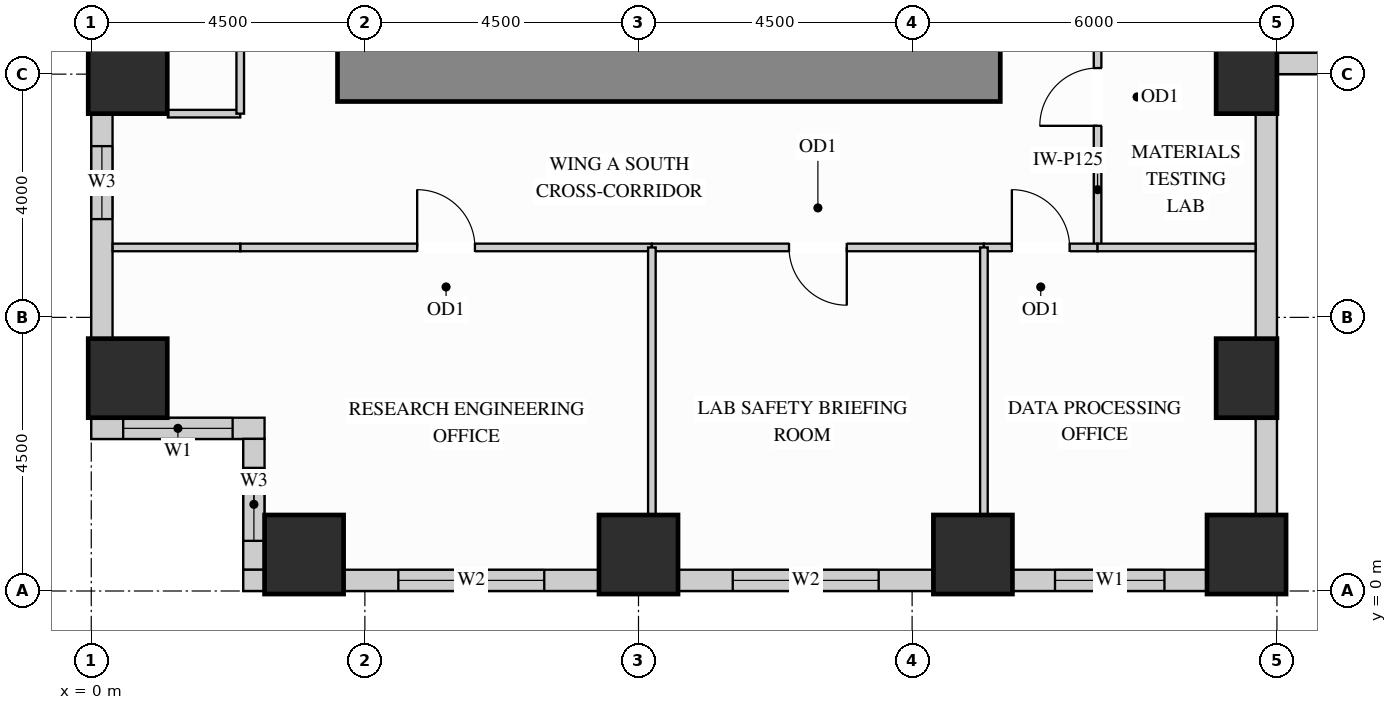
"""IFC4 building model, lengths in metres.
Left out: names, types, materials, properties, quantities, classifications, styles, units other than length and angle.
Written with IfcOpenShell. Run it as: python <this file> out.ifc"""

import sys

from ifc_helpers import new_model, si_unit, direction, frame, frame_2d, origin, origin_2d, place, context, subcontext, project, spatial, rectangle, extrude, source, transform, mapped, element, fill, save


model = new_model("IFC4")
c1 = context("Model", 3, precision=1e-05, world=origin(), true_north=direction((0.0, 1.0)))
c2 = subcontext(c1, "Body", "Model", "MODEL_VIEW")
j1 = project(units=[si_unit("LENGTHUNIT", "METRE"), si_unit("PLANEANGLEUNIT", "RADIAN")], contexts=[c1])
p1 = place(None, origin())
s1 = spatial("IfcSite", under=j1, at=p1, CompositionType="ELEMENT")
p2 = place(p1, origin())
s2 = spatial("IfcBuilding", under=s1, at=p2, CompositionType="ELEMENT")
p3 = place(p2, frame((0.0, 0.0, 58.5)))
s3 = spatial("IfcBuildingStorey", under=s2, at=p3, CompositionType="ELEMENT", Elevation=58.5)
m1 = source(origin(), c2, "Body", "SweptSolid", [
    extrude(rectangle(XDim=1.0, YDim=1.3, at=origin_2d()), origin(), (0.0, 0.0, 1.0), 3.38),
])
for number, where, z_axis, x_axis in (
    (1, (19.0, 3.5, 0.0), (0.0, 0.0, 1.0), (1.0, 0.0, 0.0)),
    (2, (19.0, 8.5, 0.0), (0.0, 0.0, 1.0), (1.0, 0.0, 0.0)),
):
    element("IfcColumn", number, at=place(p3, frame(where, z_axis=z_axis, x_axis=x_axis)), inside=s3, PredefinedType="COLUMN", context=c2, shape_type="MappedRepresentation", body=[
        mapped(m1, transform((0.0, 0.0, 0.0), x_axis=(1.0, 0.0, 0.0), y_axis=(0.0, 1.0, 0.0), z_axis=(0.0, 0.0, 1.0))),
    ])
m2 = source(origin(), c2, "Body", "SweptSolid", [
    extrude(rectangle(XDim=1.3, YDim=1.3, at=origin_2d()), origin(), (0.0, 0.0, 1.0), 3.38),
])
for number, where, z_axis, x_axis in (
    (3, (14.5, 0.6, 0.0), (0.0, 0.0, 1.0), (1.0, 0.0, 0.0)),
    (4, (19.0, 0.6, 0.0), (0.0, 0.0, 1.0), (1.0, 0.0, 0.0)),
    (5, (3.5, 0.6, 0.0), (0.0, 0.0, 1.0), (1.0, 0.0, 0.0)),
    (6, (9.0, 0.6, 0.0), (0.0, 0.0, 1.0), (1.0, 0.0, 0.0)),
    (7, (0.6, 3.5, 0.0), (0.0, 0.0, 1.0), (1.0, 0.0, 0.0)),
    (8, (0.6, 8.5, 0.0), (0.0, 0.0, 1.0), (1.0, 0.0, 0.0)),
):
    element("IfcColumn", number, at=place(p3, frame(where, z_axis=z_axis, x_axis=x_axis)), inside=s3, PredefinedType="COLUMN", context=c2, shape_type="MappedRepresentation", body=[
        mapped(m2, transform((0.0, 0.0, 0.0), x_axis=(1.0, 0.0, 0.0), y_axis=(0.0, 1.0, 0.0), z_axis=(0.0, 0.0, 1.0))),
    ])
m3 = source(origin(), c2, "Body", "SweptSolid", [
    extrude(rectangle(XDim=10.9, YDim=0.9, at=frame_2d((5.45, 0.0))), origin(), (0.0, 0.0, 1.0), 3.38),
])
p4 = place(p3, frame((4.05, 8.5, 0.0), z_axis=(0.0, 0.0, 1.0), x_axis=(1.0, 0.0, 0.0)))
e9 = element("IfcWall", 9, at=p4, inside=s3, PredefinedType="SHEAR", context=c2, shape_type="MappedRepresentation", body=[
    mapped(m3, transform((0.0, 0.0, 0.0), x_axis=(1.0, 0.0, 0.0), y_axis=(0.0, 1.0, 0.0), z_axis=(0.0, 0.0, 1.0))),
])
p5 = place(p3, frame((0.175, 7.852, 0.0), z_axis=(0.0, 0.0, 1.0), x_axis=(0.0, -1.0, 0.0)))
e10 = element("IfcWall", 10, at=p5, inside=s3, PredefinedType="SOLIDWALL", context=c2, shape_type="SweptSolid", body=[
    extrude(rectangle(XDim=3.704, YDim=0.35, at=frame_2d((1.852, 0.0))), origin(), (0.0, 0.0, 1.0), 2.51),
])
p6 = place(p5, frame((0.536, 0.0, 0.78)))
e11 = element("IfcOpeningElement", 11, at=p6, cuts=e10, PredefinedType="OPENING", context=c2, shape_type="SweptSolid", body=[
    extrude(rectangle(XDim=1.2, YDim=1.55, at=frame_2d((0.6, 0.775))), frame((0.0, 0.185, 0.0), z_axis=(0.0, -1.0, 0.0), x_axis=(1.0, 0.0, 0.0)), (0.0, 0.0, 1.0), 0.37),
])
p7 = place(p3, frame((0.0, 2.675, 0.0), z_axis=(0.0, 0.0, 1.0), x_axis=(1.0, 0.0, 0.0)))
e12 = element("IfcWall", 12, at=p7, inside=s3, PredefinedType="SOLIDWALL", context=c2, shape_type="SweptSolid", body=[
    extrude(rectangle(XDim=2.85, YDim=0.35, at=frame_2d((1.425, 0.0))), origin(), (0.0, 0.0, 1.0), 3.365),
])
p8 = place(p7, frame((0.525, 0.0, 0.78)))
e13 = element("IfcOpeningElement", 13, at=p8, cuts=e12, PredefinedType="OPENING", context=c2, shape_type="SweptSolid", body=[
    extrude(rectangle(XDim=1.8, YDim=2.1, at=frame_2d((0.9, 1.05))), frame((0.0, 0.185, 0.0), z_axis=(0.0, -1.0, 0.0), x_axis=(1.0, 0.0, 0.0)), (0.0, 0.0, 1.0), 0.37),
])
p9 = place(p3, frame((2.675, 2.502, 0.0), z_axis=(0.0, 0.0, 1.0), x_axis=(0.0, -1.0, 0.0)))
e14 = element("IfcWall", 14, at=p9, inside=s3, PredefinedType="SOLIDWALL", context=c2, shape_type="SweptSolid", body=[
    extrude(rectangle(XDim=2.154, YDim=0.35, at=frame_2d((1.077, 0.0))), origin(), (0.0, 0.0, 1.0), 3.365),
])
p10 = place(p9, frame((0.477, 0.0, 0.78)))
e15 = element("IfcOpeningElement", 15, at=p10, cuts=e14, PredefinedType="OPENING", context=c2, shape_type="SweptSolid", body=[
    extrude(rectangle(XDim=1.2, YDim=2.1, at=frame_2d((0.6, 1.05))), frame((0.0, 0.185, 0.0), z_axis=(0.0, -1.0, 0.0), x_axis=(1.0, 0.0, 0.0)), (0.0, 0.0, 1.0), 0.37),
])
m4 = source(origin(), c2, "Body", "SweptSolid", [
    extrude(rectangle(XDim=0.352, YDim=0.35, at=frame_2d((0.176, 0.0))), origin(), (0.0, 0.0, 1.0), 3.365),
])
p11 = place(p3, frame((2.5, 0.175, 0.0), z_axis=(0.0, 0.0, 1.0), x_axis=(1.0, 0.0, 0.0)))
e16 = element("IfcWall", 16, at=p11, inside=s3, PredefinedType="SOLIDWALL", context=c2, shape_type="MappedRepresentation", body=[
    mapped(m4, transform((0.0, 0.0, 0.0), x_axis=(1.0, 0.0, 0.0), y_axis=(0.0, 1.0, 0.0), z_axis=(0.0, 0.0, 1.0))),
])
p12 = place(p3, frame((4.148, 0.175, 0.0), z_axis=(0.0, 0.0, 1.0), x_axis=(1.0, 0.0, 0.0)))
e17 = element("IfcWall", 17, at=p12, inside=s3, PredefinedType="SOLIDWALL", context=c2, shape_type="SweptSolid", body=[
    extrude(rectangle(XDim=4.204, YDim=0.35, at=frame_2d((2.102, 0.0))), origin(), (0.0, 0.0, 1.0), 2.51),
])
p13 = place(p12, frame((0.902, 0.0, 0.78)))
e18 = element("IfcOpeningElement", 18, at=p13, cuts=e17, PredefinedType="OPENING", context=c2, shape_type="SweptSolid", body=[
    extrude(rectangle(XDim=2.4, YDim=1.55, at=frame_2d((1.2, 0.775))), frame((0.0, 0.185, 0.0), z_axis=(0.0, -1.0, 0.0), x_axis=(1.0, 0.0, 0.0)), (0.0, 0.0, 1.0), 0.37),
])
p14 = place(p3, frame((9.648, 0.175, 0.0), z_axis=(0.0, 0.0, 1.0), x_axis=(1.0, 0.0, 0.0)))
e19 = element("IfcWall", 19, at=p14, inside=s3, PredefinedType="SOLIDWALL", context=c2, shape_type="SweptSolid", body=[
    extrude(rectangle(XDim=4.204, YDim=0.35, at=frame_2d((2.102, 0.0))), origin(), (0.0, 0.0, 1.0), 2.51),
])
p15 = place(p14, frame((0.902, 0.0, 0.78)))
e20 = element("IfcOpeningElement", 20, at=p15, cuts=e19, PredefinedType="OPENING", context=c2, shape_type="SweptSolid", body=[
    extrude(rectangle(XDim=2.4, YDim=1.55, at=frame_2d((1.2, 0.775))), frame((0.0, 0.185, 0.0), z_axis=(0.0, -1.0, 0.0), x_axis=(1.0, 0.0, 0.0)), (0.0, 0.0, 1.0), 0.37),
])
p16 = place(p3, frame((15.148, 0.175, 0.0), z_axis=(0.0, 0.0, 1.0), x_axis=(1.0, 0.0, 0.0)))
e21 = element("IfcWall", 21, at=p16, inside=s3, PredefinedType="SOLIDWALL", context=c2, shape_type="SweptSolid", body=[
    extrude(rectangle(XDim=3.204, YDim=0.35, at=frame_2d((1.602, 0.0))), origin(), (0.0, 0.0, 1.0), 2.51),
])
p17 = place(p16, frame((0.702, 0.0, 0.78)))
e22 = element("IfcOpeningElement", 22, at=p17, cuts=e21, PredefinedType="OPENING", context=c2, shape_type="SweptSolid", body=[
    extrude(rectangle(XDim=1.8, YDim=1.55, at=frame_2d((0.9, 0.775))), frame((0.0, 0.185, 0.0), z_axis=(0.0, -1.0, 0.0), x_axis=(1.0, 0.0, 0.0)), (0.0, 0.0, 1.0), 0.37),
])
m5 = source(origin(), c2, "Body", "SweptSolid", [
    extrude(rectangle(XDim=1.604, YDim=0.35, at=frame_2d((0.802, 0.0))), origin(), (0.0, 0.0, 1.0), 2.51),
])
p18 = place(p3, frame((19.325, 1.248, 0.0), z_axis=(0.0, 0.0, 1.0), x_axis=(0.0, 1.0, 0.0)))
e23 = element("IfcWall", 23, at=p18, inside=s3, PredefinedType="SOLIDWALL", context=c2, shape_type="MappedRepresentation", body=[
    mapped(m5, transform((0.0, 0.0, 0.0), x_axis=(1.0, 0.0, 0.0), y_axis=(0.0, 1.0, 0.0), z_axis=(0.0, 0.0, 1.0))),
])
m6 = source(origin(), c2, "Body", "SweptSolid", [
    extrude(rectangle(XDim=3.704, YDim=0.35, at=frame_2d((1.852, 0.0))), origin(), (0.0, 0.0, 1.0), 2.51),
])
p19 = place(p3, frame((19.325, 4.148, 0.0), z_axis=(0.0, 0.0, 1.0), x_axis=(0.0, 1.0, 0.0)))
e24 = element("IfcWall", 24, at=p19, inside=s3, PredefinedType="SOLIDWALL", context=c2, shape_type="MappedRepresentation", body=[
    mapped(m6, transform((0.0, 0.0, 0.0), x_axis=(1.0, 0.0, 0.0), y_axis=(0.0, 1.0, 0.0), z_axis=(0.0, 0.0, 1.0))),
])
p20 = place(p3, frame((19.498, 8.675, 0.0), z_axis=(0.0, 0.0, 1.0), x_axis=(1.0, 0.0, 0.0)))
e25 = element("IfcWall", 25, at=p20, inside=s3, PredefinedType="SOLIDWALL", context=c2, shape_type="SweptSolid", body=[
    extrude(rectangle(XDim=3.404, YDim=0.35, at=frame_2d((1.702, 0.0))), origin(), (0.0, 0.0, 1.0), 3.365),
])
p21 = place(p20, frame((0.952, 0.0, 0.78)))
e26 = element("IfcOpeningElement", 26, at=p21, cuts=e25, PredefinedType="OPENING", context=c2, shape_type="SweptSolid", body=[
    extrude(rectangle(XDim=1.5, YDim=2.0, at=frame_2d((0.75, 1.0))), frame((0.0, 0.185, 0.0), z_axis=(0.0, -1.0, 0.0), x_axis=(1.0, 0.0, 0.0)), (0.0, 0.0, 1.0), 0.37),
])
p22 = place(p3, frame((16.55, 5.65, 0.0), z_axis=(0.0, 0.0, 1.0), x_axis=(0.0, 1.0, 0.0)))
e27 = element("IfcWall", 27, at=p22, inside=s3, PredefinedType="PARTITIONING", context=c2, shape_type="SweptSolid", body=[
    extrude(rectangle(XDim=4.95, YDim=0.125, at=frame_2d((2.475, 0.0))), origin(), (0.0, 0.0, 1.0), 3.365),
])
p23 = place(p22, frame((2.0, 0.0, 0.0)))
e28 = element("IfcOpeningElement", 28, at=p23, cuts=e27, PredefinedType="OPENING", context=c2, shape_type="SweptSolid", body=[
    extrude(rectangle(XDim=0.95, YDim=2.15, at=frame_2d((0.475, 1.075))), frame((0.0, 0.073, 0.0), z_axis=(0.0, -1.0, 0.0), x_axis=(1.0, 0.0, 0.0)), (0.0, 0.0, 1.0), 0.145),
])
m7 = source(origin(), c2, "Body", "SweptSolid", [
    extrude(rectangle(XDim=1.19, YDim=0.125, at=frame_2d((0.595, 0.0))), origin(), (0.0, 0.0, 1.0), 3.365),
])
p24 = place(p3, frame((1.26, 7.85, 0.0), z_axis=(0.0, 0.0, 1.0), x_axis=(1.0, 0.0, 0.0)))
e29 = element("IfcWall", 29, at=p24, inside=s3, PredefinedType="PARTITIONING", context=c2, shape_type="MappedRepresentation", body=[
    mapped(m7, transform((0.0, 0.0, 0.0), x_axis=(1.0, 0.0, 0.0), y_axis=(0.0, 1.0, 0.0), z_axis=(0.0, 0.0, 1.0))),
])
p25 = place(p3, frame((2.45, 5.65, 0.0), z_axis=(0.0, 0.0, 1.0), x_axis=(1.0, 0.0, 0.0)))
e30 = element("IfcWall", 30, at=p25, inside=s3, PredefinedType="PARTITIONING", context=c2, shape_type="SweptSolid", body=[
    extrude(rectangle(XDim=6.77, YDim=0.125, at=frame_2d((3.385, 0.0))), origin(), (0.0, 0.0, 1.0), 3.365),
])
p26 = place(p25, frame((2.91, 0.0, 0.0)))
e31 = element("IfcOpeningElement", 31, at=p26, cuts=e30, PredefinedType="OPENING", context=c2, shape_type="SweptSolid", body=[
    extrude(rectangle(XDim=0.95, YDim=2.15, at=frame_2d((0.475, 1.075))), frame((0.0, 0.073, 0.0), z_axis=(0.0, -1.0, 0.0), x_axis=(1.0, 0.0, 0.0)), (0.0, 0.0, 1.0), 0.145),
])
p27 = place(p3, frame((9.22, 5.65, 0.0), z_axis=(0.0, 0.0, 1.0), x_axis=(1.0, 0.0, 0.0)))
e32 = element("IfcWall", 32, at=p27, inside=s3, PredefinedType="PARTITIONING", context=c2, shape_type="SweptSolid", body=[
    extrude(rectangle(XDim=5.461, YDim=0.125, at=frame_2d((2.73, 0.0))), origin(), (0.0, 0.0, 1.0), 3.365),
])
p28 = place(p27, frame((2.256, 0.0, 0.0)))
e33 = element("IfcOpeningElement", 33, at=p28, cuts=e32, PredefinedType="OPENING", context=c2, shape_type="SweptSolid", body=[
    extrude(rectangle(XDim=0.95, YDim=2.15, at=frame_2d((0.475, 1.075))), frame((0.0, 0.073, 0.0), z_axis=(0.0, -1.0, 0.0), x_axis=(1.0, 0.0, 0.0)), (0.0, 0.0, 1.0), 0.145),
])
p29 = place(p3, frame((14.681, 5.65, 0.0), z_axis=(0.0, 0.0, 1.0), x_axis=(1.0, 0.0, 0.0)))
e34 = element("IfcWall", 34, at=p29, inside=s3, PredefinedType="PARTITIONING", context=c2, shape_type="SweptSolid", body=[
    extrude(rectangle(XDim=1.869, YDim=0.125, at=frame_2d((0.935, 0.0))), origin(), (0.0, 0.0, 1.0), 3.365),
])
p30 = place(p29, frame((0.459, 0.0, 0.0)))
e35 = element("IfcOpeningElement", 35, at=p30, cuts=e34, PredefinedType="OPENING", context=c2, shape_type="SweptSolid", body=[
    extrude(rectangle(XDim=0.95, YDim=2.15, at=frame_2d((0.475, 1.075))), frame((0.0, 0.073, 0.0), z_axis=(0.0, -1.0, 0.0), x_axis=(1.0, 0.0, 0.0)), (0.0, 0.0, 1.0), 0.145),
])
m8 = source(origin(), c2, "Body", "SweptSolid", [
    extrude(rectangle(XDim=2.098, YDim=0.125, at=frame_2d((1.049, 0.0))), origin(), (0.0, 0.0, 1.0), 3.365),
])
p31 = place(p3, frame((0.352, 5.65, 0.0), z_axis=(0.0, 0.0, 1.0), x_axis=(1.0, 0.0, 0.0)))
e36 = element("IfcWall", 36, at=p31, inside=s3, PredefinedType="PARTITIONING", context=c2, shape_type="MappedRepresentation", body=[
    mapped(m8, transform((0.0, 0.0, 0.0), x_axis=(1.0, 0.0, 0.0), y_axis=(0.0, 1.0, 0.0), z_axis=(0.0, 0.0, 1.0))),
])
m9 = source(origin(), c2, "Body", "SweptSolid", [
    extrude(rectangle(XDim=2.598, YDim=0.125, at=frame_2d((1.299, 0.0))), origin(), (0.0, 0.0, 1.0), 3.365),
])
p32 = place(p3, frame((16.55, 5.65, 0.0), z_axis=(0.0, 0.0, 1.0), x_axis=(1.0, 0.0, 0.0)))
e37 = element("IfcWall", 37, at=p32, inside=s3, PredefinedType="PARTITIONING", context=c2, shape_type="MappedRepresentation", body=[
    mapped(m9, transform((0.0, 0.0, 0.0), x_axis=(1.0, 0.0, 0.0), y_axis=(0.0, 1.0, 0.0), z_axis=(0.0, 0.0, 1.0))),
])
m10 = source(origin(), c2, "Body", "SweptSolid", [
    extrude(rectangle(XDim=4.39, YDim=0.125, at=frame_2d((2.195, 0.0))), origin(), (0.0, 0.0, 1.0), 3.365),
])
for number, where, z_axis, x_axis in (
    (38, (9.22, 1.26, 0.0), (0.0, 0.0, 1.0), (0.0, 1.0, 0.0)),
    (39, (14.681, 1.26, 0.0), (0.0, 0.0, 1.0), (0.0, 1.0, 0.0)),
):
    element("IfcWall", number, at=place(p3, frame(where, z_axis=z_axis, x_axis=x_axis)), inside=s3, PredefinedType="PARTITIONING", context=c2, shape_type="MappedRepresentation", body=[
        mapped(m10, transform((0.0, 0.0, 0.0), x_axis=(1.0, 0.0, 0.0), y_axis=(0.0, 1.0, 0.0), z_axis=(0.0, 0.0, 1.0))),
    ])
p33 = place(p3, frame((2.45, 7.85, 0.0), z_axis=(0.0, 0.0, 1.0), x_axis=(0.0, 1.0, 0.0)))
e40 = element("IfcWall", 40, at=p33, inside=s3, PredefinedType="PARTITIONING", context=c2, shape_type="SweptSolid", body=[
    extrude(rectangle(XDim=7.25, YDim=0.125, at=frame_2d((3.625, 0.0))), origin(), (0.0, 0.0, 1.0), 3.365),
])
p34 = place(p33, frame((3.15, 0.0, 0.0)))
e41 = element("IfcOpeningElement", 41, at=p34, cuts=e40, PredefinedType="OPENING", context=c2, shape_type="SweptSolid", body=[
    extrude(rectangle(XDim=0.95, YDim=2.15, at=frame_2d((0.475, 1.075))), frame((0.0, 0.073, 0.0), z_axis=(0.0, -1.0, 0.0), x_axis=(1.0, 0.0, 0.0)), (0.0, 0.0, 1.0), 0.145),
])
m11 = source(origin(), c2, "Body", "SweptSolid", [
    extrude(rectangle(XDim=0.95, YDim=2.15, at=frame_2d((0.475, 1.075))), frame((0.0, 0.025, 0.0), z_axis=(0.0, -1.0, 0.0), x_axis=(1.0, 0.0, 0.0)), (0.0, 0.0, 1.0), 0.05),
])
p35 = place(p23, origin())
e42 = element("IfcDoor", 42, at=p35, inside=s3, OperationType="SINGLE_SWING_LEFT", PredefinedType="DOOR", context=c2, shape_type="MappedRepresentation", body=[
    mapped(m11, transform((0.0, 0.0, 0.0), x_axis=(1.0, 0.0, 0.0), y_axis=(0.0, 1.0, 0.0), z_axis=(0.0, 0.0, 1.0))),
])
fill(e28, e42)
p36 = place(p26, origin())
e43 = element("IfcDoor", 43, at=p36, inside=s3, OperationType="SINGLE_SWING_LEFT", PredefinedType="DOOR", context=c2, shape_type="MappedRepresentation", body=[
    mapped(m11, transform((0.0, 0.0, 0.0), x_axis=(1.0, 0.0, 0.0), y_axis=(0.0, 1.0, 0.0), z_axis=(0.0, 0.0, 1.0))),
])
fill(e31, e43)
p37 = place(p28, origin())
e44 = element("IfcDoor", 44, at=p37, inside=s3, OperationType="SINGLE_SWING_RIGHT", PredefinedType="DOOR", context=c2, shape_type="MappedRepresentation", body=[
    mapped(m11, transform((0.0, 0.0, 0.0), x_axis=(1.0, 0.0, 0.0), y_axis=(0.0, 1.0, 0.0), z_axis=(0.0, 0.0, 1.0))),
])
fill(e33, e44)
p38 = place(p30, origin())
e45 = element("IfcDoor", 45, at=p38, inside=s3, OperationType="SINGLE_SWING_LEFT", PredefinedType="DOOR", context=c2, shape_type="MappedRepresentation", body=[
    mapped(m11, transform((0.0, 0.0, 0.0), x_axis=(1.0, 0.0, 0.0), y_axis=(0.0, 1.0, 0.0), z_axis=(0.0, 0.0, 1.0))),
])
fill(e35, e45)
m12 = source(origin(), c2, "Body", "SweptSolid", [
    extrude(rectangle(XDim=1.8, YDim=2.1, at=frame_2d((0.9, 1.05))), frame((0.0, 0.03, 0.0), z_axis=(0.0, -1.0, 0.0), x_axis=(1.0, 0.0, 0.0)), (0.0, 0.0, 1.0), 0.06),
])
p39 = place(p8, origin())
e46 = element("IfcWindow", 46, at=p39, inside=s3, PartitioningType="SINGLE_PANEL", PredefinedType="WINDOW", context=c2, shape_type="MappedRepresentation", body=[
    mapped(m12, transform((0.0, 0.0, 0.0), x_axis=(1.0, 0.0, 0.0), y_axis=(0.0, 1.0, 0.0), z_axis=(0.0, 0.0, 1.0))),
])
fill(e13, e46)
m13 = source(origin(), c2, "Body", "SweptSolid", [
    extrude(rectangle(XDim=1.8, YDim=1.55, at=frame_2d((0.9, 0.775))), frame((0.0, 0.03, 0.0), z_axis=(0.0, -1.0, 0.0), x_axis=(1.0, 0.0, 0.0)), (0.0, 0.0, 1.0), 0.06),
])
p40 = place(p17, origin())
e47 = element("IfcWindow", 47, at=p40, inside=s3, PartitioningType="SINGLE_PANEL", PredefinedType="WINDOW", context=c2, shape_type="MappedRepresentation", body=[
    mapped(m13, transform((0.0, 0.0, 0.0), x_axis=(1.0, 0.0, 0.0), y_axis=(0.0, 1.0, 0.0), z_axis=(0.0, 0.0, 1.0))),
])
fill(e22, e47)
m14 = source(origin(), c2, "Body", "SweptSolid", [
    extrude(rectangle(XDim=2.4, YDim=1.55, at=frame_2d((1.2, 0.775))), frame((0.0, 0.03, 0.0), z_axis=(0.0, -1.0, 0.0), x_axis=(1.0, 0.0, 0.0)), (0.0, 0.0, 1.0), 0.06),
])
p41 = place(p13, origin())
e48 = element("IfcWindow", 48, at=p41, inside=s3, PartitioningType="SINGLE_PANEL", PredefinedType="WINDOW", context=c2, shape_type="MappedRepresentation", body=[
    mapped(m14, transform((0.0, 0.0, 0.0), x_axis=(1.0, 0.0, 0.0), y_axis=(0.0, 1.0, 0.0), z_axis=(0.0, 0.0, 1.0))),
])
fill(e18, e48)
p42 = place(p15, origin())
e49 = element("IfcWindow", 49, at=p42, inside=s3, PartitioningType="SINGLE_PANEL", PredefinedType="WINDOW", context=c2, shape_type="MappedRepresentation", body=[
    mapped(m14, transform((0.0, 0.0, 0.0), x_axis=(1.0, 0.0, 0.0), y_axis=(0.0, 1.0, 0.0), z_axis=(0.0, 0.0, 1.0))),
])
fill(e20, e49)
m15 = source(origin(), c2, "Body", "SweptSolid", [
    extrude(rectangle(XDim=1.2, YDim=1.55, at=frame_2d((0.6, 0.775))), frame((0.0, 0.03, 0.0), z_axis=(0.0, -1.0, 0.0), x_axis=(1.0, 0.0, 0.0)), (0.0, 0.0, 1.0), 0.06),
])
p43 = place(p6, origin())
e50 = element("IfcWindow", 50, at=p43, inside=s3, PartitioningType="SINGLE_PANEL", PredefinedType="WINDOW", context=c2, shape_type="MappedRepresentation", body=[
    mapped(m15, transform((0.0, 0.0, 0.0), x_axis=(1.0, 0.0, 0.0), y_axis=(0.0, 1.0, 0.0), z_axis=(0.0, 0.0, 1.0))),
])
fill(e11, e50)
m16 = source(origin(), c2, "Body", "SweptSolid", [
    extrude(rectangle(XDim=1.2, YDim=2.1, at=frame_2d((0.6, 1.05))), frame((0.0, 0.03, 0.0), z_axis=(0.0, -1.0, 0.0), x_axis=(1.0, 0.0, 0.0)), (0.0, 0.0, 1.0), 0.06),
])
p44 = place(p10, origin())
e51 = element("IfcWindow", 51, at=p44, inside=s3, PartitioningType="SINGLE_PANEL", PredefinedType="WINDOW", context=c2, shape_type="MappedRepresentation", body=[
    mapped(m16, transform((0.0, 0.0, 0.0), x_axis=(1.0, 0.0, 0.0), y_axis=(0.0, 1.0, 0.0), z_axis=(0.0, 0.0, 1.0))),
])
fill(e15, e51)
save(model, sys.argv[1])
